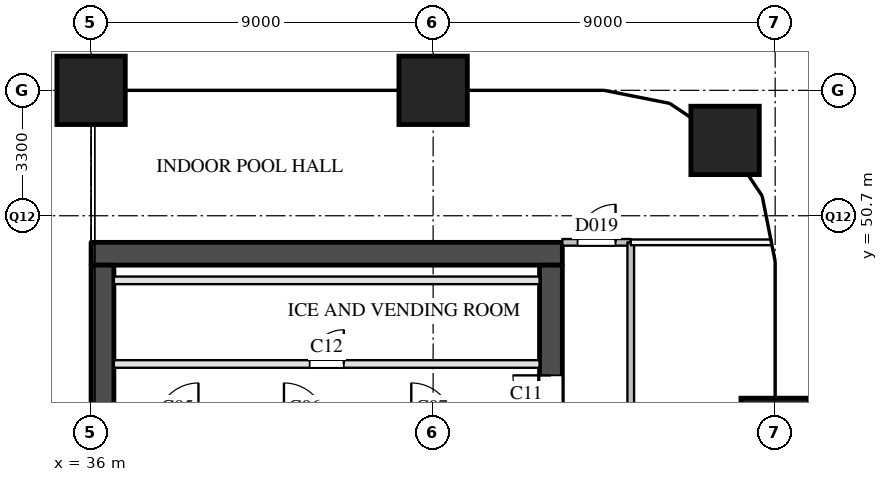
"""IFC4 building model, lengths in metres.
Left out: names, types, materials, properties, quantities, classifications, styles, units other than length and angle.
Written with IfcOpenShell. Run it as: python <this file> out.ifc"""

import sys

from ifc_helpers import new_model, si_unit, direction, frame, frame_2d, origin, origin_2d, place, context, subcontext, project, spatial, rectangle, extrude, element, fill, save


model = new_model("IFC4")
c1 = context("Model", 3, precision=1e-05, world=origin(), true_north=direction((0.0, 1.0)))
c2 = subcontext(c1, "Body", "Model", "MODEL_VIEW")
j1 = project(units=[si_unit("LENGTHUNIT", "METRE"), si_unit("PLANEANGLEUNIT", "RADIAN")], contexts=[c1])
p1 = place(None, origin())
s1 = spatial("IfcSite", under=j1, at=p1, CompositionType="ELEMENT")
p2 = place(p1, origin())
s2 = spatial("IfcBuilding", under=s1, at=p2, CompositionType="ELEMENT")
p3 = place(p2, frame((0.0, 0.0, 21.0)))
s3 = spatial("IfcBuildingStorey", under=s2, at=p3, CompositionType="ELEMENT", Elevation=21.0)
for number, where, z_axis, x_axis in (
    (1, (36.0, 54.0, 0.0), (0.0, 0.0, 1.0), (1.0, 0.0, 0.0)),
    (2, (45.0, 54.0, 0.0), (0.0, 0.0, 1.0), (1.0, 0.0, 0.0)),
    (3, (54.0, 45.0, 0.0), (0.0, 0.0, 1.0), (1.0, 0.0, 0.0)),
    (4, (52.682, 52.682, 0.0), (0.0, 0.0, 1.0), (1.0, 0.0, 0.0)),
):
    element("IfcColumn", number, at=place(p3, frame(where, z_axis=z_axis, x_axis=x_axis)), inside=s3, PredefinedType="COLUMN", context=c2, shape_type="SweptSolid", body=[
        extrude(rectangle(XDim=1.8, YDim=1.8, at=origin_2d()), origin(), (0.0, 0.0, 1.0), 5.0),
    ])
p4 = place(p3, frame((36.0, 49.7, 0.0), z_axis=(0.0, 0.0, 1.0), x_axis=(1.0, 0.0, 0.0)))
e5 = element("IfcWall", 5, at=p4, inside=s3, PredefinedType="SHEAR", context=c2, shape_type="SweptSolid", body=[
    extrude(rectangle(XDim=12.4, YDim=0.6, at=frame_2d((6.2, 0.0))), origin(), (0.0, 0.0, 1.0), 4.55),
])
p5 = place(p3, frame((36.3, 29.1, 0.0), z_axis=(0.0, 0.0, 1.0), x_axis=(0.0, 1.0, 0.0)))
e6 = element("IfcWall", 6, at=p5, inside=s3, PredefinedType="SHEAR", context=c2, shape_type="SweptSolid", body=[
    extrude(rectangle(XDim=20.3, YDim=0.6, at=frame_2d((10.15, 0.0))), origin(), (0.0, 0.0, 1.0), 4.55),
])
p6 = place(p3, frame((48.1, 29.1, 0.0), z_axis=(0.0, 0.0, 1.0), x_axis=(0.0, 1.0, 0.0)))
e7 = element("IfcWall", 7, at=p6, inside=s3, PredefinedType="SHEAR", context=c2, shape_type="SweptSolid", body=[
    extrude(rectangle(XDim=20.3, YDim=0.6, at=frame_2d((10.15, 0.0))), origin(), (0.0, 0.0, 1.0), 4.55),
])
p7 = place(p6, frame((12.5, 0.0, 0.0)))
e8 = element("IfcOpeningElement", 8, at=p7, cuts=e7, PredefinedType="OPENING", context=c2, shape_type="SweptSolid", body=[
    extrude(rectangle(XDim=0.7, YDim=2.1, at=frame_2d((0.35, 1.05))), frame((0.0, 0.31, 0.0), z_axis=(0.0, -1.0, 0.0), x_axis=(1.0, 0.0, 0.0)), (0.0, 0.0, 1.0), 0.62),
])
p8 = place(p6, frame((3.9, 0.0, 0.0)))
e9 = element("IfcOpeningElement", 9, at=p8, cuts=e7, PredefinedType="OPENING", context=c2, shape_type="SweptSolid", body=[
    extrude(rectangle(XDim=1.8, YDim=2.1, at=frame_2d((0.9, 1.05))), frame((0.0, 0.31, 0.0), z_axis=(0.0, -1.0, 0.0), x_axis=(1.0, 0.0, 0.0)), (0.0, 0.0, 1.0), 0.62),
])
p9 = place(p6, frame((16.4, 0.0, 0.0)))
e10 = element("IfcOpeningElement", 10, at=p9, cuts=e7, PredefinedType="OPENING", context=c2, shape_type="SweptSolid", body=[
    extrude(rectangle(XDim=1.0, YDim=2.1, at=frame_2d((0.5, 1.05))), frame((0.0, 0.31, 0.0), z_axis=(0.0, -1.0, 0.0), x_axis=(1.0, 0.0, 0.0)), (0.0, 0.0, 1.0), 0.62),
])
p10 = place(p3, frame((36.6, 46.8, 0.0), z_axis=(0.0, 0.0, 1.0), x_axis=(1.0, 0.0, 0.0)))
e11 = element("IfcWall", 11, at=p10, inside=s3, PredefinedType="PARTITIONING", context=c2, shape_type="SweptSolid", body=[
    extrude(rectangle(XDim=11.2, YDim=0.2, at=frame_2d((5.6, 0.0))), origin(), (0.0, 0.0, 1.0), 4.55),
])
p11 = place(p10, frame((5.15, 0.0, 0.0)))
e12 = element("IfcOpeningElement", 12, at=p11, cuts=e11, PredefinedType="OPENING", context=c2, shape_type="SweptSolid", body=[
    extrude(rectangle(XDim=0.9, YDim=2.1, at=frame_2d((0.45, 1.05))), frame((0.0, 0.11, 0.0), z_axis=(0.0, -1.0, 0.0), x_axis=(1.0, 0.0, 0.0)), (0.0, 0.0, 1.0), 0.22),
])
p12 = place(p3, frame((36.6, 49.0, 0.0), z_axis=(0.0, 0.0, 1.0), x_axis=(1.0, 0.0, 0.0)))
e13 = element("IfcWall", 13, at=p12, inside=s3, PredefinedType="PARTITIONING", context=c2, shape_type="SweptSolid", body=[
    extrude(rectangle(XDim=11.2, YDim=0.2, at=frame_2d((5.6, 0.0))), origin(), (0.0, 0.0, 1.0), 4.55),
])
p13 = place(p3, frame((48.4, 50.0, 0.0), z_axis=(0.0, 0.0, 1.0), x_axis=(1.0, 0.0, 0.0)))
e14 = element("IfcWall", 14, at=p13, inside=s3, PredefinedType="PARTITIONING", context=c2, shape_type="SweptSolid", body=[
    extrude(rectangle(XDim=1.8, YDim=0.175, at=frame_2d((0.9, 0.0))), origin(), (0.0, 0.0, 1.0), 4.55),
])
p14 = place(p13, frame((0.4, 0.0, 0.0)))
e15 = element("IfcOpeningElement", 15, at=p14, cuts=e14, PredefinedType="OPENING", context=c2, shape_type="SweptSolid", body=[
    extrude(rectangle(XDim=1.0, YDim=2.1, at=frame_2d((0.5, 1.05))), frame((0.0, 0.097, 0.0), z_axis=(0.0, -1.0, 0.0), x_axis=(1.0, 0.0, 0.0)), (0.0, 0.0, 1.0), 0.195),
])
p15 = place(p3, frame((50.2, 28.5, 0.0), z_axis=(0.0, 0.0, 1.0), x_axis=(0.0, 1.0, 0.0)))
e16 = element("IfcWall", 16, at=p15, inside=s3, PredefinedType="PARTITIONING", context=c2, shape_type="SweptSolid", body=[
    extrude(rectangle(XDim=21.5, YDim=0.175, at=frame_2d((10.75, 0.0))), origin(), (0.0, 0.0, 1.0), 4.55),
])
p16 = place(p15, frame((5.25, 0.0, 0.0)))
e17 = element("IfcOpeningElement", 17, at=p16, cuts=e16, PredefinedType="OPENING", context=c2, shape_type="SweptSolid", body=[
    extrude(rectangle(XDim=1.0, YDim=2.1, at=frame_2d((0.5, 1.05))), frame((0.0, 0.097, 0.0), z_axis=(0.0, -1.0, 0.0), x_axis=(1.0, 0.0, 0.0)), (0.0, 0.0, 1.0), 0.195),
])
p17 = place(p15, frame((16.0, 0.0, 0.0)))
e18 = element("IfcOpeningElement", 18, at=p17, cuts=e16, PredefinedType="OPENING", context=c2, shape_type="SweptSolid", body=[
    extrude(rectangle(XDim=1.0, YDim=2.1, at=frame_2d((0.5, 1.05))), frame((0.0, 0.097, 0.0), z_axis=(0.0, -1.0, 0.0), x_axis=(1.0, 0.0, 0.0)), (0.0, 0.0, 1.0), 0.195),
])
p18 = place(p3, frame((50.2, 50.0, 0.0), z_axis=(0.0, 0.0, 1.0), x_axis=(1.0, 0.0, 0.0)))
e19 = element("IfcWall", 19, at=p18, inside=s3, PredefinedType="PARTITIONING", context=c2, shape_type="SweptSolid", body=[
    extrude(rectangle(XDim=3.7, YDim=0.15, at=frame_2d((1.85, 0.0))), origin(), (0.0, 0.0, 1.0), 3.55),
])
p19 = place(p9, origin())
e20 = element("IfcDoor", 20, at=p19, inside=s3, OperationType="SINGLE_SWING_RIGHT", PredefinedType="DOOR", context=c2, shape_type="SweptSolid", body=[
    extrude(rectangle(XDim=1.0, YDim=2.1, at=frame_2d((0.5, 1.05))), frame((0.0, 0.025, 0.0), z_axis=(0.0, -1.0, 0.0), x_axis=(1.0, 0.0, 0.0)), (0.0, 0.0, 1.0), 0.05),
])
fill(e10, e20)
p20 = place(p11, origin())
e21 = element("IfcDoor", 21, at=p20, inside=s3, OperationType="SINGLE_SWING_RIGHT", PredefinedType="DOOR", context=c2, shape_type="SweptSolid", body=[
    extrude(rectangle(XDim=0.9, YDim=2.1, at=frame_2d((0.45, 1.05))), frame((0.0, 0.025, 0.0), z_axis=(0.0, -1.0, 0.0), x_axis=(1.0, 0.0, 0.0)), (0.0, 0.0, 1.0), 0.05),
])
fill(e12, e21)
p21 = place(p14, origin())
e22 = element("IfcDoor", 22, at=p21, inside=s3, OperationType="SINGLE_SWING_RIGHT", PredefinedType="DOOR", context=c2, shape_type="SweptSolid", body=[
    extrude(rectangle(XDim=1.0, YDim=2.1, at=frame_2d((0.5, 1.05))), frame((0.0, 0.025, 0.0), z_axis=(0.0, -1.0, 0.0), x_axis=(1.0, 0.0, 0.0)), (0.0, 0.0, 1.0), 0.05),
])
fill(e15, e22)
save(model, sys.argv[1])
